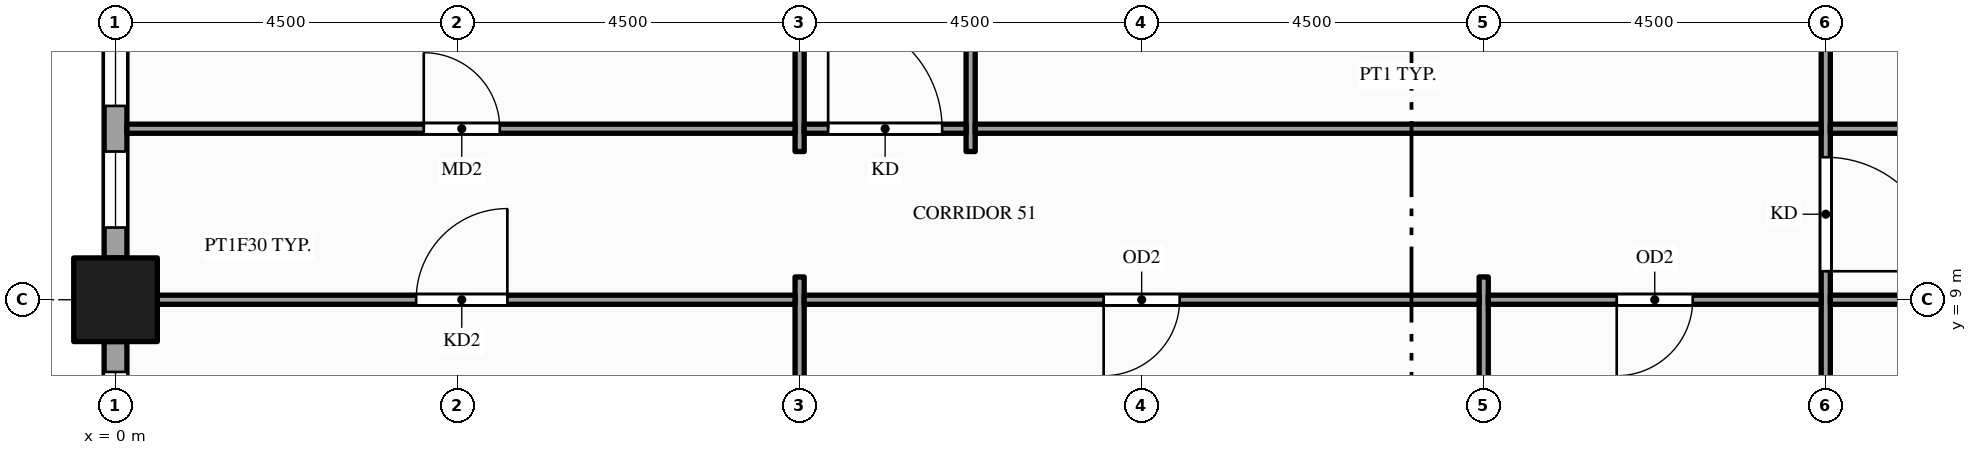
"""IFC4 building model, lengths in metres.
Left out: names, types, materials, properties, quantities, classifications, styles, units other than length and angle.
Written with IfcOpenShell. Run it as: python <this file> out.ifc"""

import sys

from ifc_helpers import new_model, si_unit, direction, frame, frame_2d, origin, origin_2d, place, context, subcontext, project, spatial, rectangle, hollow_rectangle, extrude, element, fill, save


model = new_model("IFC4")
c1 = context("Model", 3, precision=1e-05, world=origin(), true_north=direction((0.0, 1.0)))
c2 = subcontext(c1, "Body", "Model", "MODEL_VIEW")
j1 = project(units=[si_unit("LENGTHUNIT", "METRE"), si_unit("PLANEANGLEUNIT", "RADIAN")], contexts=[c1])
p1 = place(None, origin())
s1 = spatial("IfcSite", under=j1, at=p1, CompositionType="ELEMENT")
p2 = place(p1, origin())
s2 = spatial("IfcBuilding", under=s1, at=p2, CompositionType="ELEMENT")
p3 = place(p2, frame((0.0, 0.0, 8.0)))
s3 = spatial("IfcBuildingStorey", under=s2, at=p3, CompositionType="ELEMENT", Elevation=8.0)
p4 = place(p3, frame((0.0, 9.0, -0.25), z_axis=(0.0, 0.0, 1.0), x_axis=(1.0, 0.0, 0.0)))
e1 = element("IfcColumn", 1, at=p4, inside=s3, PredefinedType="COLUMN", context=c2, shape_type="SweptSolid", body=[
    extrude(hollow_rectangle(XDim=1.1, YDim=1.1, WallThickness=0.06, at=origin_2d()), origin(), (0.0, 0.0, 1.0), 6.0),
])
p5 = place(p3, frame((0.0, 12.95, 0.0), z_axis=(0.0, 0.0, 1.0), x_axis=(0.0, -1.0, 0.0)))
e2 = element("IfcWall", 2, at=p5, inside=s3, PredefinedType="STANDARD", context=c2, shape_type="SweptSolid", body=[
    extrude(rectangle(XDim=3.4, YDim=0.3, at=frame_2d((1.7, 0.0))), origin(), (0.0, 0.0, 1.0), 5.036),
])
p6 = place(p5, frame((0.4, 0.0, 0.9)))
e3 = element("IfcOpeningElement", 3, at=p6, cuts=e2, PredefinedType="OPENING", context=c2, shape_type="SweptSolid", body=[
    extrude(rectangle(XDim=1.0, YDim=3.5, at=frame_2d((0.5, 1.75))), frame((0.0, 0.16, 0.0), z_axis=(0.0, -1.0, 0.0), x_axis=(1.0, 0.0, 0.0)), (0.0, 0.0, 1.0), 0.32),
])
p7 = place(p5, frame((2.0, 0.0, 0.9)))
e4 = element("IfcOpeningElement", 4, at=p7, cuts=e2, PredefinedType="OPENING", context=c2, shape_type="SweptSolid", body=[
    extrude(rectangle(XDim=1.0, YDim=3.5, at=frame_2d((0.5, 1.75))), frame((0.0, 0.16, 0.0), z_axis=(0.0, -1.0, 0.0), x_axis=(1.0, 0.0, 0.0)), (0.0, 0.0, 1.0), 0.32),
])
p8 = place(p3, frame((0.0, 8.45, 0.0), z_axis=(0.0, 0.0, 1.0), x_axis=(0.0, -1.0, 0.0)))
e5 = element("IfcWall", 5, at=p8, inside=s3, PredefinedType="STANDARD", context=c2, shape_type="SweptSolid", body=[
    extrude(rectangle(XDim=3.4, YDim=0.3, at=frame_2d((1.7, 0.0))), origin(), (0.0, 0.0, 1.0), 5.036),
])
p9 = place(p8, frame((0.4, 0.0, 0.9)))
e6 = element("IfcOpeningElement", 6, at=p9, cuts=e5, PredefinedType="OPENING", context=c2, shape_type="SweptSolid", body=[
    extrude(rectangle(XDim=1.0, YDim=3.5, at=frame_2d((0.5, 1.75))), frame((0.0, 0.16, 0.0), z_axis=(0.0, -1.0, 0.0), x_axis=(1.0, 0.0, 0.0)), (0.0, 0.0, 1.0), 0.32),
])
p10 = place(p8, frame((2.0, 0.0, 0.9)))
e7 = element("IfcOpeningElement", 7, at=p10, cuts=e5, PredefinedType="OPENING", context=c2, shape_type="SweptSolid", body=[
    extrude(rectangle(XDim=1.0, YDim=3.5, at=frame_2d((0.5, 1.75))), frame((0.0, 0.16, 0.0), z_axis=(0.0, -1.0, 0.0), x_axis=(1.0, 0.0, 0.0)), (0.0, 0.0, 1.0), 0.32),
])
p11 = place(p3, frame((9.0, 3.875, 0.0), z_axis=(0.0, 0.0, 1.0), x_axis=(0.0, 1.0, 0.0)))
e8 = element("IfcWall", 8, at=p11, inside=s3, PredefinedType="PARTITIONING", context=c2, shape_type="SweptSolid", body=[
    extrude(rectangle(XDim=5.425, YDim=0.12, at=frame_2d((2.712, 0.0))), origin(), (0.0, 0.0, 1.0), 4.759),
])
p12 = place(p3, frame((9.0, 10.95, 0.0), z_axis=(0.0, 0.0, 1.0), x_axis=(0.0, 1.0, 0.0)))
e9 = element("IfcWall", 9, at=p12, inside=s3, PredefinedType="PARTITIONING", context=c2, shape_type="SweptSolid", body=[
    extrude(rectangle(XDim=20.85, YDim=0.12, at=frame_2d((10.425, 0.0))), origin(), (0.0, 0.0, 1.0), 4.5),
])
p13 = place(p12, frame((12.175, 0.0, 0.0)))
e10 = element("IfcOpeningElement", 10, at=p13, cuts=e9, PredefinedType="OPENING", context=c2, shape_type="SweptSolid", body=[
    extrude(rectangle(XDim=1.0, YDim=2.1, at=frame_2d((0.5, 1.05))), frame((0.0, 0.07, 0.0), z_axis=(0.0, -1.0, 0.0), x_axis=(1.0, 0.0, 0.0)), (0.0, 0.0, 1.0), 0.14),
])
p14 = place(p12, frame((15.55, 0.0, 0.0)))
e11 = element("IfcOpeningElement", 11, at=p14, cuts=e9, PredefinedType="OPENING", context=c2, shape_type="SweptSolid", body=[
    extrude(rectangle(XDim=1.0, YDim=2.1, at=frame_2d((0.5, 1.05))), frame((0.0, 0.07, 0.0), z_axis=(0.0, -1.0, 0.0), x_axis=(1.0, 0.0, 0.0)), (0.0, 0.0, 1.0), 0.14),
])
p15 = place(p12, frame((18.925, 0.0, 0.0)))
e12 = element("IfcOpeningElement", 12, at=p15, cuts=e9, PredefinedType="OPENING", context=c2, shape_type="SweptSolid", body=[
    extrude(rectangle(XDim=1.0, YDim=2.1, at=frame_2d((0.5, 1.05))), frame((0.0, 0.07, 0.0), z_axis=(0.0, -1.0, 0.0), x_axis=(1.0, 0.0, 0.0)), (0.0, 0.0, 1.0), 0.14),
])
p16 = place(p3, frame((11.25, 10.95, 0.0), z_axis=(0.0, 0.0, 1.0), x_axis=(0.0, 1.0, 0.0)))
e13 = element("IfcWall", 13, at=p16, inside=s3, PredefinedType="PARTITIONING", context=c2, shape_type="SweptSolid", body=[
    extrude(rectangle(XDim=20.85, YDim=0.12, at=frame_2d((10.425, 0.0))), origin(), (0.0, 0.0, 1.0), 4.5),
])
p17 = place(p16, frame((5.425, 0.0, 0.0)))
e14 = element("IfcOpeningElement", 14, at=p17, cuts=e13, PredefinedType="OPENING", context=c2, shape_type="SweptSolid", body=[
    extrude(rectangle(XDim=1.0, YDim=2.1, at=frame_2d((0.5, 1.05))), frame((0.0, 0.07, 0.0), z_axis=(0.0, -1.0, 0.0), x_axis=(1.0, 0.0, 0.0)), (0.0, 0.0, 1.0), 0.14),
])
p18 = place(p16, frame((13.3, 0.0, 0.0)))
e15 = element("IfcOpeningElement", 15, at=p18, cuts=e13, PredefinedType="OPENING", context=c2, shape_type="SweptSolid", body=[
    extrude(rectangle(XDim=1.0, YDim=2.1, at=frame_2d((0.5, 1.05))), frame((0.0, 0.07, 0.0), z_axis=(0.0, -1.0, 0.0), x_axis=(1.0, 0.0, 0.0)), (0.0, 0.0, 1.0), 0.14),
])
p19 = place(p16, frame((17.8, 0.0, 0.0)))
e16 = element("IfcOpeningElement", 16, at=p19, cuts=e13, PredefinedType="OPENING", context=c2, shape_type="SweptSolid", body=[
    extrude(rectangle(XDim=1.0, YDim=2.1, at=frame_2d((0.5, 1.05))), frame((0.0, 0.07, 0.0), z_axis=(0.0, -1.0, 0.0), x_axis=(1.0, 0.0, 0.0)), (0.0, 0.0, 1.0), 0.14),
])
p20 = place(p3, frame((18.0, 0.15, 0.0), z_axis=(0.0, 0.0, 1.0), x_axis=(0.0, 1.0, 0.0)))
e17 = element("IfcWall", 17, at=p20, inside=s3, PredefinedType="PARTITIONING", context=c2, shape_type="SweptSolid", body=[
    extrude(rectangle(XDim=9.15, YDim=0.12, at=frame_2d((4.575, 0.0))), origin(), (0.0, 0.0, 1.0), 4.759),
])
p21 = place(p3, frame((22.5, 0.15, 0.0), z_axis=(0.0, 0.0, 1.0), x_axis=(0.0, 1.0, 0.0)))
e18 = element("IfcWall", 18, at=p21, inside=s3, PredefinedType="PARTITIONING", context=c2, shape_type="SweptSolid", body=[
    extrude(rectangle(XDim=35.95, YDim=0.12, at=frame_2d((17.975, 0.0))), origin(), (0.0, 0.0, 1.0), 4.759),
])
p22 = place(p21, frame((9.225, 0.0, 0.0)))
e19 = element("IfcOpeningElement", 19, at=p22, cuts=e18, PredefinedType="OPENING", context=c2, shape_type="SweptSolid", body=[
    extrude(rectangle(XDim=1.5, YDim=2.1, at=frame_2d((0.75, 1.05))), frame((0.0, 0.07, 0.0), z_axis=(0.0, -1.0, 0.0), x_axis=(1.0, 0.0, 0.0)), (0.0, 0.0, 1.0), 0.14),
])
p23 = place(p21, frame((32.7, 0.0, 0.0)))
e20 = element("IfcOpeningElement", 20, at=p23, cuts=e18, PredefinedType="OPENING", context=c2, shape_type="SweptSolid", body=[
    extrude(rectangle(XDim=1.8, YDim=2.1, at=frame_2d((0.9, 1.05))), frame((0.0, 0.07, 0.0), z_axis=(0.0, -1.0, 0.0), x_axis=(1.0, 0.0, 0.0)), (0.0, 0.0, 1.0), 0.14),
])
p24 = place(p3, frame((0.15, 9.0, 0.0), z_axis=(0.0, 0.0, 1.0), x_axis=(1.0, 0.0, 0.0)))
e21 = element("IfcWall", 21, at=p24, inside=s3, PredefinedType="PARTITIONING", context=c2, shape_type="SweptSolid", body=[
    extrude(rectangle(XDim=8.79, YDim=0.12, at=frame_2d((4.395, 0.0))), origin(), (0.0, 0.0, 1.0), 4.759),
])
p25 = place(p24, frame((3.805, 0.0, 0.0)))
e22 = element("IfcOpeningElement", 22, at=p25, cuts=e21, PredefinedType="OPENING", context=c2, shape_type="SweptSolid", body=[
    extrude(rectangle(XDim=1.2, YDim=2.1, at=frame_2d((0.6, 1.05))), frame((0.0, 0.07, 0.0), z_axis=(0.0, -1.0, 0.0), x_axis=(1.0, 0.0, 0.0)), (0.0, 0.0, 1.0), 0.14),
])
p26 = place(p3, frame((9.06, 9.0, 0.0), z_axis=(0.0, 0.0, 1.0), x_axis=(1.0, 0.0, 0.0)))
e23 = element("IfcWall", 23, at=p26, inside=s3, PredefinedType="PARTITIONING", context=c2, shape_type="SweptSolid", body=[
    extrude(rectangle(XDim=8.88, YDim=0.12, at=frame_2d((4.44, 0.0))), origin(), (0.0, 0.0, 1.0), 4.759),
])
p27 = place(p26, frame((3.94, 0.0, 0.0)))
e24 = element("IfcOpeningElement", 24, at=p27, cuts=e23, PredefinedType="OPENING", context=c2, shape_type="SweptSolid", body=[
    extrude(rectangle(XDim=1.0, YDim=2.1, at=frame_2d((0.5, 1.05))), frame((0.0, 0.07, 0.0), z_axis=(0.0, -1.0, 0.0), x_axis=(1.0, 0.0, 0.0)), (0.0, 0.0, 1.0), 0.14),
])
p28 = place(p3, frame((18.06, 9.0, 0.0), z_axis=(0.0, 0.0, 1.0), x_axis=(1.0, 0.0, 0.0)))
e25 = element("IfcWall", 25, at=p28, inside=s3, PredefinedType="PARTITIONING", context=c2, shape_type="SweptSolid", body=[
    extrude(rectangle(XDim=4.38, YDim=0.12, at=frame_2d((2.19, 0.0))), origin(), (0.0, 0.0, 1.0), 4.759),
])
p29 = place(p28, frame((1.69, 0.0, 0.0)))
e26 = element("IfcOpeningElement", 26, at=p29, cuts=e25, PredefinedType="OPENING", context=c2, shape_type="SweptSolid", body=[
    extrude(rectangle(XDim=1.0, YDim=2.1, at=frame_2d((0.5, 1.05))), frame((0.0, 0.07, 0.0), z_axis=(0.0, -1.0, 0.0), x_axis=(1.0, 0.0, 0.0)), (0.0, 0.0, 1.0), 0.14),
])
p30 = place(p3, frame((22.56, 9.0, 0.0), z_axis=(0.0, 0.0, 1.0), x_axis=(1.0, 0.0, 0.0)))
e27 = element("IfcWall", 27, at=p30, inside=s3, PredefinedType="PARTITIONING", context=c2, shape_type="SweptSolid", body=[
    extrude(rectangle(XDim=8.88, YDim=0.12, at=frame_2d((4.44, 0.0))), origin(), (0.0, 0.0, 1.0), 4.66),
])
p31 = place(p30, frame((3.84, 0.0, 0.0)))
e28 = element("IfcOpeningElement", 28, at=p31, cuts=e27, PredefinedType="OPENING", context=c2, shape_type="SweptSolid", body=[
    extrude(rectangle(XDim=1.2, YDim=2.1, at=frame_2d((0.6, 1.05))), frame((0.0, 0.07, 0.0), z_axis=(0.0, -1.0, 0.0), x_axis=(1.0, 0.0, 0.0)), (0.0, 0.0, 1.0), 0.14),
])
p32 = place(p3, frame((0.15, 11.25, 0.0), z_axis=(0.0, 0.0, 1.0), x_axis=(1.0, 0.0, 0.0)))
e29 = element("IfcWall", 29, at=p32, inside=s3, PredefinedType="PARTITIONING", context=c2, shape_type="SweptSolid", body=[
    extrude(rectangle(XDim=8.79, YDim=0.12, at=frame_2d((4.395, 0.0))), origin(), (0.0, 0.0, 1.0), 4.759),
])
p33 = place(p32, frame((3.905, 0.0, 0.0)))
e30 = element("IfcOpeningElement", 30, at=p33, cuts=e29, PredefinedType="OPENING", context=c2, shape_type="SweptSolid", body=[
    extrude(rectangle(XDim=1.0, YDim=2.1, at=frame_2d((0.5, 1.05))), frame((0.0, 0.07, 0.0), z_axis=(0.0, -1.0, 0.0), x_axis=(1.0, 0.0, 0.0)), (0.0, 0.0, 1.0), 0.14),
])
p34 = place(p3, frame((9.06, 11.25, 0.0), z_axis=(0.0, 0.0, 1.0), x_axis=(1.0, 0.0, 0.0)))
e31 = element("IfcWall", 31, at=p34, inside=s3, PredefinedType="PARTITIONING", context=c2, shape_type="SweptSolid", body=[
    extrude(rectangle(XDim=2.13, YDim=0.12, at=frame_2d((1.065, 0.0))), origin(), (0.0, 0.0, 1.0), 4.759),
])
p35 = place(p34, frame((0.315, 0.0, 0.0)))
e32 = element("IfcOpeningElement", 32, at=p35, cuts=e31, PredefinedType="OPENING", context=c2, shape_type="SweptSolid", body=[
    extrude(rectangle(XDim=1.5, YDim=2.1, at=frame_2d((0.75, 1.05))), frame((0.0, 0.07, 0.0), z_axis=(0.0, -1.0, 0.0), x_axis=(1.0, 0.0, 0.0)), (0.0, 0.0, 1.0), 0.14),
])
p36 = place(p3, frame((11.31, 11.25, 0.0), z_axis=(0.0, 0.0, 1.0), x_axis=(1.0, 0.0, 0.0)))
e33 = element("IfcWall", 33, at=p36, inside=s3, PredefinedType="PARTITIONING", context=c2, shape_type="SweptSolid", body=[
    extrude(rectangle(XDim=11.13, YDim=0.12, at=frame_2d((5.565, 0.0))), origin(), (0.0, 0.0, 1.0), 4.759),
])
p37 = place(p3, frame((22.56, 11.25, 0.0), z_axis=(0.0, 0.0, 1.0), x_axis=(1.0, 0.0, 0.0)))
e34 = element("IfcWall", 34, at=p37, inside=s3, PredefinedType="PARTITIONING", context=c2, shape_type="SweptSolid", body=[
    extrude(rectangle(XDim=8.88, YDim=0.12, at=frame_2d((4.44, 0.0))), origin(), (0.0, 0.0, 1.0), 4.66),
])
p38 = place(p37, frame((3.84, 0.0, 0.0)))
e35 = element("IfcOpeningElement", 35, at=p38, cuts=e34, PredefinedType="OPENING", context=c2, shape_type="SweptSolid", body=[
    extrude(rectangle(XDim=1.2, YDim=2.1, at=frame_2d((0.6, 1.05))), frame((0.0, 0.07, 0.0), z_axis=(0.0, -1.0, 0.0), x_axis=(1.0, 0.0, 0.0)), (0.0, 0.0, 1.0), 0.14),
])
p39 = place(p6, origin())
e36 = element("IfcWindow", 36, at=p39, inside=s3, PartitioningType="SINGLE_PANEL", PredefinedType="WINDOW", context=c2, shape_type="SweptSolid", body=[
    extrude(rectangle(XDim=1.0, YDim=3.5, at=frame_2d((0.5, 1.75))), frame((0.0, 0.03, 0.0), z_axis=(0.0, -1.0, 0.0), x_axis=(1.0, 0.0, 0.0)), (0.0, 0.0, 1.0), 0.06),
])
fill(e3, e36)
p40 = place(p7, origin())
e37 = element("IfcWindow", 37, at=p40, inside=s3, PartitioningType="SINGLE_PANEL", PredefinedType="WINDOW", context=c2, shape_type="SweptSolid", body=[
    extrude(rectangle(XDim=1.0, YDim=3.5, at=frame_2d((0.5, 1.75))), frame((0.0, 0.03, 0.0), z_axis=(0.0, -1.0, 0.0), x_axis=(1.0, 0.0, 0.0)), (0.0, 0.0, 1.0), 0.06),
])
fill(e4, e37)
p41 = place(p9, origin())
e38 = element("IfcWindow", 38, at=p41, inside=s3, PartitioningType="SINGLE_PANEL", PredefinedType="WINDOW", context=c2, shape_type="SweptSolid", body=[
    extrude(rectangle(XDim=1.0, YDim=3.5, at=frame_2d((0.5, 1.75))), frame((0.0, 0.03, 0.0), z_axis=(0.0, -1.0, 0.0), x_axis=(1.0, 0.0, 0.0)), (0.0, 0.0, 1.0), 0.06),
])
fill(e6, e38)
p42 = place(p25, origin())
e39 = element("IfcDoor", 39, at=p42, inside=s3, OperationType="SINGLE_SWING_RIGHT", PredefinedType="DOOR", context=c2, shape_type="SweptSolid", body=[
    extrude(rectangle(XDim=1.2, YDim=2.1, at=frame_2d((0.6, 1.05))), frame((0.0, 0.025, 0.0), z_axis=(0.0, -1.0, 0.0), x_axis=(1.0, 0.0, 0.0)), (0.0, 0.0, 1.0), 0.05),
])
fill(e22, e39)
p43 = place(p22, origin())
e40 = element("IfcDoor", 40, at=p43, inside=s3, OperationType="SINGLE_SWING_LEFT", PredefinedType="DOOR", context=c2, shape_type="SweptSolid", body=[
    extrude(rectangle(XDim=1.5, YDim=2.1, at=frame_2d((0.75, 1.05))), frame((0.0, 0.025, 0.0), z_axis=(0.0, -1.0, 0.0), x_axis=(1.0, 0.0, 0.0)), (0.0, 0.0, 1.0), 0.05),
])
fill(e19, e40)
p44 = place(p27, origin())
e41 = element("IfcDoor", 41, at=p44, inside=s3, OperationType="SINGLE_SWING_LEFT", PredefinedType="DOOR", context=c2, shape_type="SweptSolid", body=[
    extrude(rectangle(XDim=1.0, YDim=2.1, at=frame_2d((0.5, 1.05))), frame((0.0, 0.025, 0.0), z_axis=(0.0, -1.0, 0.0), x_axis=(1.0, 0.0, 0.0)), (0.0, 0.0, 1.0), 0.05),
])
fill(e24, e41)
p45 = place(p29, origin())
e42 = element("IfcDoor", 42, at=p45, inside=s3, OperationType="SINGLE_SWING_LEFT", PredefinedType="DOOR", context=c2, shape_type="SweptSolid", body=[
    extrude(rectangle(XDim=1.0, YDim=2.1, at=frame_2d((0.5, 1.05))), frame((0.0, 0.025, 0.0), z_axis=(0.0, -1.0, 0.0), x_axis=(1.0, 0.0, 0.0)), (0.0, 0.0, 1.0), 0.05),
])
fill(e26, e42)
p46 = place(p35, origin())
e43 = element("IfcDoor", 43, at=p46, inside=s3, OperationType="SINGLE_SWING_LEFT", PredefinedType="DOOR", context=c2, shape_type="SweptSolid", body=[
    extrude(rectangle(XDim=1.5, YDim=2.1, at=frame_2d((0.75, 1.05))), frame((0.0, 0.025, 0.0), z_axis=(0.0, -1.0, 0.0), x_axis=(1.0, 0.0, 0.0)), (0.0, 0.0, 1.0), 0.05),
])
fill(e32, e43)
p47 = place(p33, origin())
e44 = element("IfcDoor", 44, at=p47, inside=s3, OperationType="SINGLE_SWING_LEFT", PredefinedType="DOOR", context=c2, shape_type="SweptSolid", body=[
    extrude(rectangle(XDim=1.0, YDim=2.1, at=frame_2d((0.5, 1.05))), frame((0.0, 0.025, 0.0), z_axis=(0.0, -1.0, 0.0), x_axis=(1.0, 0.0, 0.0)), (0.0, 0.0, 1.0), 0.05),
])
fill(e30, e44)
save(model, sys.argv[1])
